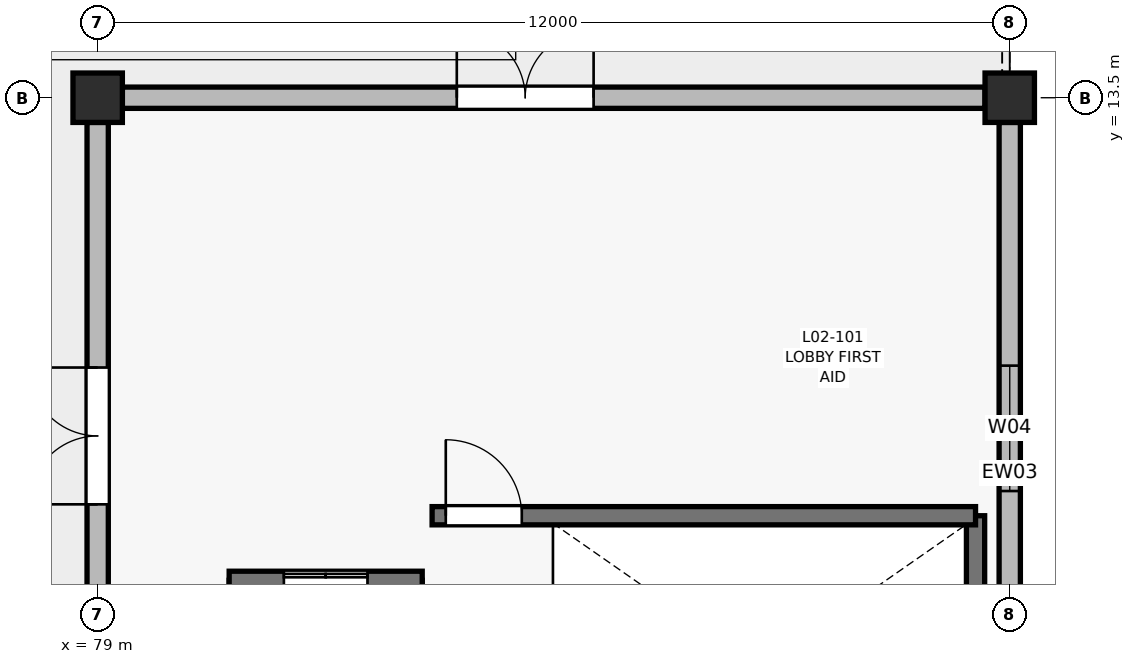
"""IFC4 building model, lengths in metres.
Left out: names, types, materials, properties, quantities, classifications, styles, units other than length and angle.
Written with IfcOpenShell. Run it as: python <this file> out.ifc"""

import sys

from ifc_helpers import new_model, si_unit, direction, frame, frame_2d, origin, origin_2d, place, context, subcontext, project, spatial, rectangle, extrude, element, fill, save


model = new_model("IFC4")
c1 = context("Model", 3, precision=1e-05, world=origin(), true_north=direction((0.0, 1.0)))
c2 = subcontext(c1, "Body", "Model", "MODEL_VIEW")
j1 = project(units=[si_unit("LENGTHUNIT", "METRE"), si_unit("PLANEANGLEUNIT", "RADIAN")], contexts=[c1])
p1 = place(None, origin())
s1 = spatial("IfcSite", under=j1, at=p1, CompositionType="ELEMENT")
p2 = place(p1, origin())
s2 = spatial("IfcBuilding", under=s1, at=p2, CompositionType="ELEMENT")
p3 = place(p2, frame((0.0, 0.0, 9.0)))
s3 = spatial("IfcBuildingStorey", under=s2, at=p3, CompositionType="ELEMENT", Elevation=9.0)
for number, where, z_axis, x_axis in (
    (1, (79.0, 13.5, 0.0), (0.0, 0.0, 1.0), (1.0, 0.0, 0.0)),
    (2, (91.0, 13.5, 0.0), (0.0, 0.0, 1.0), (1.0, 0.0, 0.0)),
):
    element("IfcColumn", number, at=place(p3, frame(where, z_axis=z_axis, x_axis=x_axis)), inside=s3, PredefinedType="COLUMN", context=c2, shape_type="SweptSolid", body=[
        extrude(rectangle(XDim=0.65, YDim=0.65, at=origin_2d()), origin(), (0.0, 0.0, 1.0), 4.2),
    ])
p4 = place(p3, frame((79.0, 3.95, 0.0), z_axis=(0.0, 0.0, 1.0), x_axis=(0.0, 1.0, 0.0)))
e3 = element("IfcWall", 3, at=p4, inside=s3, PredefinedType="SOLIDWALL", context=c2, shape_type="SweptSolid", body=[
    extrude(rectangle(XDim=9.225, YDim=0.28, at=frame_2d((4.613, 0.0))), origin(), (0.0, 0.0, 1.0), 3.1),
])
p5 = place(p4, frame((4.2, 0.0, 0.0)))
e4 = element("IfcOpeningElement", 4, at=p5, cuts=e3, PredefinedType="OPENING", context=c2, shape_type="SweptSolid", body=[
    extrude(rectangle(XDim=1.8, YDim=2.25, at=frame_2d((0.9, 1.125))), frame((0.0, 0.15, 0.0), z_axis=(0.0, -1.0, 0.0), x_axis=(1.0, 0.0, 0.0)), (0.0, 0.0, 1.0), 0.3),
])
p6 = place(p3, frame((79.325, 13.5, 0.0), z_axis=(0.0, 0.0, 1.0), x_axis=(1.0, 0.0, 0.0)))
e5 = element("IfcWall", 5, at=p6, inside=s3, PredefinedType="SOLIDWALL", context=c2, shape_type="SweptSolid", body=[
    extrude(rectangle(XDim=11.35, YDim=0.28, at=frame_2d((5.675, 0.0))), origin(), (0.0, 0.0, 1.0), 3.1),
])
p7 = place(p6, frame((4.4, 0.0, 0.0)))
e6 = element("IfcOpeningElement", 6, at=p7, cuts=e5, PredefinedType="OPENING", context=c2, shape_type="SweptSolid", body=[
    extrude(rectangle(XDim=1.8, YDim=2.25, at=frame_2d((0.9, 1.125))), frame((0.0, 0.15, 0.0), z_axis=(0.0, -1.0, 0.0), x_axis=(1.0, 0.0, 0.0)), (0.0, 0.0, 1.0), 0.3),
])
p8 = place(p3, frame((91.0, 13.175, 0.0), z_axis=(0.0, 0.0, 1.0), x_axis=(0.0, -1.0, 0.0)))
e7 = element("IfcWall", 7, at=p8, inside=s3, PredefinedType="SOLIDWALL", context=c2, shape_type="SweptSolid", body=[
    extrude(rectangle(XDim=9.225, YDim=0.28, at=frame_2d((4.613, 0.0))), origin(), (0.0, 0.0, 1.0), 3.1),
])
p9 = place(p8, frame((3.2, 0.0, 0.9)))
e8 = element("IfcOpeningElement", 8, at=p9, cuts=e7, PredefinedType="OPENING", context=c2, shape_type="SweptSolid", body=[
    extrude(rectangle(XDim=1.65, YDim=1.5, at=frame_2d((0.825, 0.75))), frame((0.0, 0.15, 0.0), z_axis=(0.0, -1.0, 0.0), x_axis=(1.0, 0.0, 0.0)), (0.0, 0.0, 1.0), 0.3),
])
for number, where, z_axis, x_axis in (
    (9, (80.85, 4.45, 0.0), (0.0, 0.0, 1.0), (0.0, 1.0, 0.0)),
    (10, (83.15, 7.15, 0.0), (0.0, 0.0, 1.0), (0.0, -1.0, 0.0)),
):
    element("IfcWall", number, at=place(p3, frame(where, z_axis=z_axis, x_axis=x_axis)), inside=s3, PredefinedType="SHEAR", context=c2, shape_type="SweptSolid", body=[
        extrude(rectangle(XDim=2.7, YDim=0.24, at=frame_2d((1.35, 0.0))), origin(), (0.0, 0.0, 1.0), 3.98),
    ])
p10 = place(p3, frame((80.73, 7.15, 0.0), z_axis=(0.0, 0.0, 1.0), x_axis=(1.0, 0.0, 0.0)))
e11 = element("IfcWall", 11, at=p10, inside=s3, PredefinedType="SHEAR", context=c2, shape_type="SweptSolid", body=[
    extrude(rectangle(XDim=2.54, YDim=0.24, at=frame_2d((1.27, 0.0))), origin(), (0.0, 0.0, 1.0), 3.98),
])
p11 = place(p10, frame((0.72, 0.0, 0.0)))
e12 = element("IfcOpeningElement", 12, at=p11, cuts=e11, PredefinedType="OPENING", context=c2, shape_type="SweptSolid", body=[
    extrude(rectangle(XDim=1.1, YDim=2.15, at=frame_2d((0.55, 1.075))), frame((0.0, 0.13, 0.0), z_axis=(0.0, -1.0, 0.0), x_axis=(1.0, 0.0, 0.0)), (0.0, 0.0, 1.0), 0.26),
])
p12 = place(p3, frame((90.55, 4.0, 0.0), z_axis=(0.0, 0.0, 1.0), x_axis=(0.0, 1.0, 0.0)))
e13 = element("IfcWall", 13, at=p12, inside=s3, PredefinedType="SHEAR", context=c2, shape_type="SweptSolid", body=[
    extrude(rectangle(XDim=4.0, YDim=0.24, at=frame_2d((2.0, 0.0))), origin(), (0.0, 0.0, 1.0), 3.98),
])
p13 = place(p3, frame((83.4, 8.0, 0.0), z_axis=(0.0, 0.0, 1.0), x_axis=(1.0, 0.0, 0.0)))
e14 = element("IfcWall", 14, at=p13, inside=s3, PredefinedType="SHEAR", context=c2, shape_type="SweptSolid", body=[
    extrude(rectangle(XDim=7.15, YDim=0.24, at=frame_2d((3.575, 0.0))), origin(), (0.0, 0.0, 1.0), 3.98),
])
p14 = place(p13, frame((0.18, 0.0, 0.0)))
e15 = element("IfcOpeningElement", 15, at=p14, cuts=e14, PredefinedType="OPENING", context=c2, shape_type="SweptSolid", body=[
    extrude(rectangle(XDim=1.0, YDim=2.15, at=frame_2d((0.5, 1.075))), frame((0.0, 0.13, 0.0), z_axis=(0.0, -1.0, 0.0), x_axis=(1.0, 0.0, 0.0)), (0.0, 0.0, 1.0), 0.26),
])
p15 = place(p5, origin())
e16 = element("IfcDoor", 16, at=p15, inside=s3, OperationType="DOUBLE_DOOR_SINGLE_SWING", PredefinedType="DOOR", context=c2, shape_type="SweptSolid", body=[
    extrude(rectangle(XDim=1.8, YDim=2.25, at=frame_2d((0.9, 1.125))), frame((0.0, 0.025, 0.0), z_axis=(0.0, -1.0, 0.0), x_axis=(1.0, 0.0, 0.0)), (0.0, 0.0, 1.0), 0.05),
])
fill(e4, e16)
p16 = place(p7, origin())
e17 = element("IfcDoor", 17, at=p16, inside=s3, OperationType="DOUBLE_DOOR_SINGLE_SWING", PredefinedType="DOOR", context=c2, shape_type="SweptSolid", body=[
    extrude(rectangle(XDim=1.8, YDim=2.25, at=frame_2d((0.9, 1.125))), frame((0.0, 0.025, 0.0), z_axis=(0.0, -1.0, 0.0), x_axis=(1.0, 0.0, 0.0)), (0.0, 0.0, 1.0), 0.05),
])
fill(e6, e17)
p17 = place(p9, origin())
e18 = element("IfcWindow", 18, at=p17, inside=s3, PartitioningType="SINGLE_PANEL", PredefinedType="WINDOW", context=c2, shape_type="SweptSolid", body=[
    extrude(rectangle(XDim=1.65, YDim=1.5, at=frame_2d((0.825, 0.75))), frame((0.0, 0.03, 0.0), z_axis=(0.0, -1.0, 0.0), x_axis=(1.0, 0.0, 0.0)), (0.0, 0.0, 1.0), 0.06),
])
fill(e8, e18)
p18 = place(p11, origin())
e19 = element("IfcDoor", 19, at=p18, inside=s3, OperationType="DOUBLE_DOOR_SLIDING", PredefinedType="USERDEFINED", context=c2, shape_type="SweptSolid", body=[
    extrude(rectangle(XDim=1.1, YDim=2.15, at=frame_2d((0.55, 1.075))), frame((0.0, 0.025, 0.0), z_axis=(0.0, -1.0, 0.0), x_axis=(1.0, 0.0, 0.0)), (0.0, 0.0, 1.0), 0.05),
])
fill(e12, e19)
p19 = place(p14, origin())
e20 = element("IfcDoor", 20, at=p19, inside=s3, OperationType="SINGLE_SWING_LEFT", PredefinedType="DOOR", context=c2, shape_type="SweptSolid", body=[
    extrude(rectangle(XDim=1.0, YDim=2.15, at=frame_2d((0.5, 1.075))), frame((0.0, 0.025, 0.0), z_axis=(0.0, -1.0, 0.0), x_axis=(1.0, 0.0, 0.0)), (0.0, 0.0, 1.0), 0.05),
])
fill(e15, e20)
save(model, sys.argv[1])
